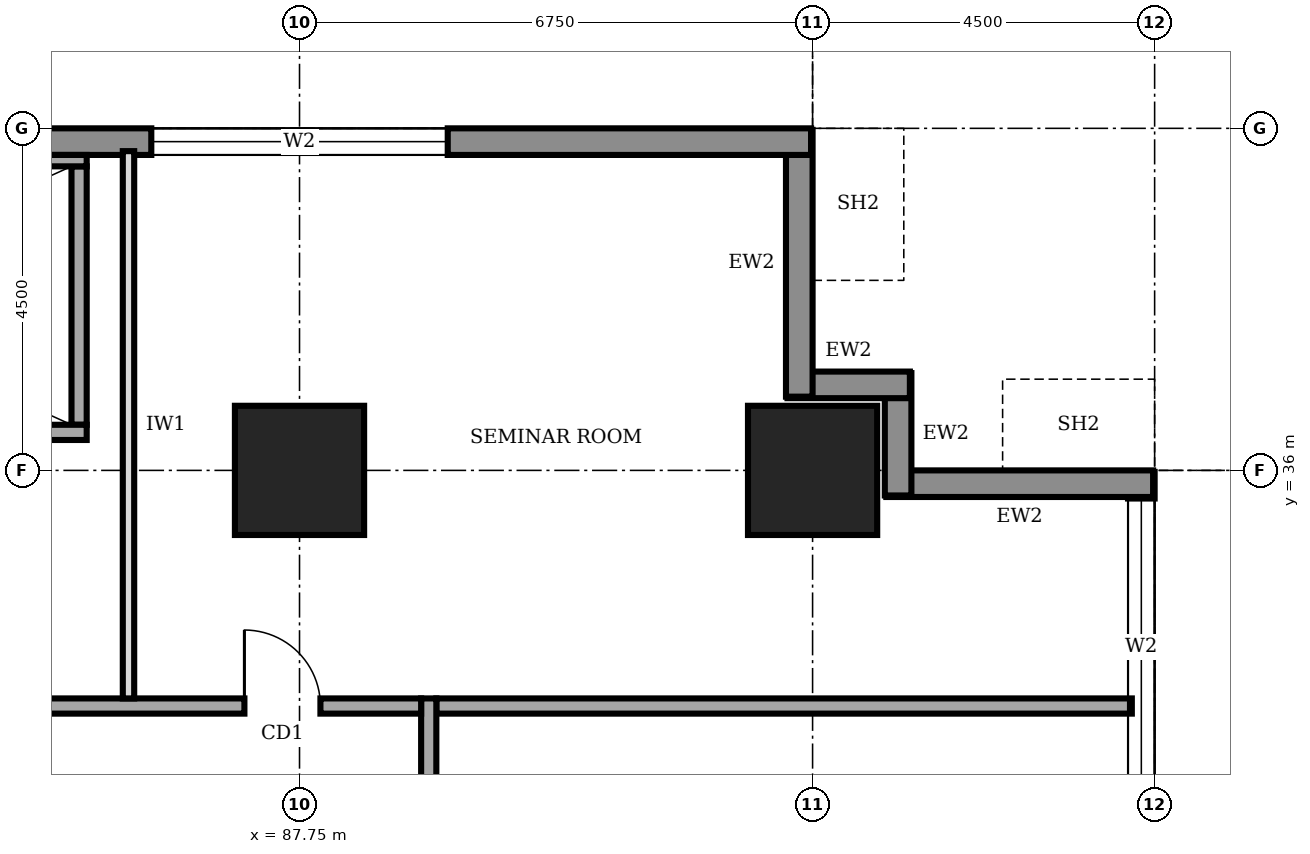
"""IFC4 building model, lengths in metres.
Left out: names, types, materials, properties, quantities, classifications, styles, units other than length and angle.
Written with IfcOpenShell. Run it as: python <this file> out.ifc"""

import sys

from ifc_helpers import new_model, si_unit, direction, frame, frame_2d, origin, origin_2d, place, context, subcontext, project, spatial, rectangle, extrude, element, fill, save


model = new_model("IFC4")
c1 = context("Model", 3, precision=1e-05, world=origin(), true_north=direction((0.0, 1.0)))
c2 = subcontext(c1, "Body", "Model", "MODEL_VIEW")
j1 = project(units=[si_unit("LENGTHUNIT", "METRE"), si_unit("PLANEANGLEUNIT", "RADIAN")], contexts=[c1])
p1 = place(None, origin())
s1 = spatial("IfcSite", under=j1, at=p1, CompositionType="ELEMENT")
p2 = place(p1, origin())
s2 = spatial("IfcBuilding", under=s1, at=p2, CompositionType="ELEMENT")
p3 = place(p2, frame((0.0, 0.0, 69.0)))
s3 = spatial("IfcBuildingStorey", under=s2, at=p3, CompositionType="ELEMENT", Elevation=69.0)
for number, where, z_axis, x_axis in (
    (1, (87.75, 36.0, 0.0), (0.0, 0.0, 1.0), (1.0, 0.0, 0.0)),
    (2, (94.5, 36.0, 0.0), (0.0, 0.0, 1.0), (1.0, 0.0, 0.0)),
):
    element("IfcColumn", number, at=place(p3, frame(where, z_axis=z_axis, x_axis=x_axis)), inside=s3, PredefinedType="COLUMN", context=c2, shape_type="SweptSolid", body=[
        extrude(rectangle(XDim=1.7, YDim=1.7, at=origin_2d()), origin(), (0.0, 0.0, 1.0), 4.0),
    ])
p4 = place(p3, frame((98.825, 4.52, 0.0), z_axis=(0.0, 0.0, 1.0), x_axis=(0.0, 1.0, 0.0)))
e3 = element("IfcWall", 3, at=p4, inside=s3, PredefinedType="STANDARD", context=c2, shape_type="SweptSolid", body=[
    extrude(rectangle(XDim=31.46, YDim=0.35, at=frame_2d((15.73, 0.0))), origin(), (0.0, 0.0, 1.0), 3.75),
])
p5 = place(p4, frame((4.78, 0.0, 0.6)))
e4 = element("IfcOpeningElement", 4, at=p5, cuts=e3, PredefinedType="OPENING", context=c2, shape_type="SweptSolid", body=[
    extrude(rectangle(XDim=3.9, YDim=2.6, at=frame_2d((1.95, 1.3))), frame((0.0, 0.185, 0.0), z_axis=(0.0, -1.0, 0.0), x_axis=(1.0, 0.0, 0.0)), (0.0, 0.0, 1.0), 0.37),
])
p6 = place(p4, frame((9.28, 0.0, 0.6)))
e5 = element("IfcOpeningElement", 5, at=p6, cuts=e3, PredefinedType="OPENING", context=c2, shape_type="SweptSolid", body=[
    extrude(rectangle(XDim=3.9, YDim=2.6, at=frame_2d((1.95, 1.3))), frame((0.0, 0.185, 0.0), z_axis=(0.0, -1.0, 0.0), x_axis=(1.0, 0.0, 0.0)), (0.0, 0.0, 1.0), 0.37),
])
p7 = place(p4, frame((13.78, 0.0, 0.6)))
e6 = element("IfcOpeningElement", 6, at=p7, cuts=e3, PredefinedType="OPENING", context=c2, shape_type="SweptSolid", body=[
    extrude(rectangle(XDim=3.9, YDim=2.6, at=frame_2d((1.95, 1.3))), frame((0.0, 0.185, 0.0), z_axis=(0.0, -1.0, 0.0), x_axis=(1.0, 0.0, 0.0)), (0.0, 0.0, 1.0), 0.37),
])
p8 = place(p4, frame((18.28, 0.0, 0.6)))
e7 = element("IfcOpeningElement", 7, at=p8, cuts=e3, PredefinedType="OPENING", context=c2, shape_type="SweptSolid", body=[
    extrude(rectangle(XDim=3.9, YDim=2.6, at=frame_2d((1.95, 1.3))), frame((0.0, 0.185, 0.0), z_axis=(0.0, -1.0, 0.0), x_axis=(1.0, 0.0, 0.0)), (0.0, 0.0, 1.0), 0.37),
])
p9 = place(p4, frame((22.78, 0.0, 0.6)))
e8 = element("IfcOpeningElement", 8, at=p9, cuts=e3, PredefinedType="OPENING", context=c2, shape_type="SweptSolid", body=[
    extrude(rectangle(XDim=3.9, YDim=2.6, at=frame_2d((1.95, 1.3))), frame((0.0, 0.185, 0.0), z_axis=(0.0, -1.0, 0.0), x_axis=(1.0, 0.0, 0.0)), (0.0, 0.0, 1.0), 0.37),
])
p10 = place(p4, frame((27.21, 0.0, 0.6)))
e9 = element("IfcOpeningElement", 9, at=p10, cuts=e3, PredefinedType="OPENING", context=c2, shape_type="SweptSolid", body=[
    extrude(rectangle(XDim=3.9, YDim=2.6, at=frame_2d((1.95, 1.3))), frame((0.0, 0.185, 0.0), z_axis=(0.0, -1.0, 0.0), x_axis=(1.0, 0.0, 0.0)), (0.0, 0.0, 1.0), 0.37),
])
p11 = place(p3, frame((98.98, 35.825, 0.0), z_axis=(0.0, 0.0, 1.0), x_axis=(-1.0, 0.0, 0.0)))
e10 = element("IfcWall", 10, at=p11, inside=s3, PredefinedType="STANDARD", context=c2, shape_type="SweptSolid", body=[
    extrude(rectangle(XDim=3.51, YDim=0.35, at=frame_2d((1.755, 0.0))), origin(), (0.0, 0.0, 1.0), 2.85),
])
for number, where, z_axis, x_axis in (
    (11, (95.625, 35.67, 0.0), (0.0, 0.0, 1.0), (0.0, 1.0, 0.0)),
    (12, (95.78, 37.125, 0.0), (0.0, 0.0, 1.0), (-1.0, 0.0, 0.0)),
):
    element("IfcWall", number, at=place(p3, frame(where, z_axis=z_axis, x_axis=x_axis)), inside=s3, PredefinedType="STANDARD", context=c2, shape_type="SweptSolid", body=[
        extrude(rectangle(XDim=1.61, YDim=0.35, at=frame_2d((0.805, 0.0))), origin(), (0.0, 0.0, 1.0), 3.75),
    ])
p12 = place(p3, frame((94.325, 36.97, 0.0), z_axis=(0.0, 0.0, 1.0), x_axis=(0.0, 1.0, 0.0)))
e13 = element("IfcWall", 13, at=p12, inside=s3, PredefinedType="STANDARD", context=c2, shape_type="SweptSolid", body=[
    extrude(rectangle(XDim=3.51, YDim=0.35, at=frame_2d((1.755, 0.0))), origin(), (0.0, 0.0, 1.0), 2.85),
])
p13 = place(p3, frame((94.48, 40.325, 0.0), z_axis=(0.0, 0.0, 1.0), x_axis=(-1.0, 0.0, 0.0)))
e14 = element("IfcWall", 14, at=p13, inside=s3, PredefinedType="STANDARD", context=c2, shape_type="SweptSolid", body=[
    extrude(rectangle(XDim=26.96, YDim=0.35, at=frame_2d((13.48, 0.0))), origin(), (0.0, 0.0, 1.0), 3.75),
])
p14 = place(p13, frame((22.71, 0.0, 0.6)))
e15 = element("IfcOpeningElement", 15, at=p14, cuts=e14, PredefinedType="OPENING", context=c2, shape_type="SweptSolid", body=[
    extrude(rectangle(XDim=3.9, YDim=2.6, at=frame_2d((1.95, 1.3))), frame((0.0, 0.185, 0.0), z_axis=(0.0, -1.0, 0.0), x_axis=(1.0, 0.0, 0.0)), (0.0, 0.0, 1.0), 0.37),
])
p15 = place(p13, frame((18.28, 0.0, 0.6)))
e16 = element("IfcOpeningElement", 16, at=p15, cuts=e14, PredefinedType="OPENING", context=c2, shape_type="SweptSolid", body=[
    extrude(rectangle(XDim=3.9, YDim=2.6, at=frame_2d((1.95, 1.3))), frame((0.0, 0.185, 0.0), z_axis=(0.0, -1.0, 0.0), x_axis=(1.0, 0.0, 0.0)), (0.0, 0.0, 1.0), 0.37),
])
p16 = place(p13, frame((4.78, 0.0, 0.6)))
e17 = element("IfcOpeningElement", 17, at=p16, cuts=e14, PredefinedType="OPENING", context=c2, shape_type="SweptSolid", body=[
    extrude(rectangle(XDim=3.9, YDim=2.6, at=frame_2d((1.95, 1.3))), frame((0.0, 0.185, 0.0), z_axis=(0.0, -1.0, 0.0), x_axis=(1.0, 0.0, 0.0)), (0.0, 0.0, 1.0), 0.37),
])
p17 = place(p3, frame((89.45, 7.7, 0.0), z_axis=(0.0, 0.0, 1.0), x_axis=(0.0, 1.0, 0.0)))
e18 = element("IfcWall", 18, at=p17, inside=s3, PredefinedType="SOLIDWALL", context=c2, shape_type="SweptSolid", body=[
    extrude(rectangle(XDim=25.3, YDim=0.2, at=frame_2d((12.65, 0.0))), origin(), (0.0, 0.0, 1.0), 3.75),
])
p18 = place(p17, frame((2.3, 0.0, 0.0)))
e19 = element("IfcOpeningElement", 19, at=p18, cuts=e18, PredefinedType="OPENING", context=c2, shape_type="SweptSolid", body=[
    extrude(rectangle(XDim=1.0, YDim=2.1, at=frame_2d((0.5, 1.05))), frame((0.0, 0.11, 0.0), z_axis=(0.0, -1.0, 0.0), x_axis=(1.0, 0.0, 0.0)), (0.0, 0.0, 1.0), 0.22),
])
p19 = place(p17, frame((6.55, 0.0, 0.0)))
e20 = element("IfcOpeningElement", 20, at=p19, cuts=e18, PredefinedType="OPENING", context=c2, shape_type="SweptSolid", body=[
    extrude(rectangle(XDim=0.9, YDim=2.1, at=frame_2d((0.45, 1.05))), frame((0.0, 0.11, 0.0), z_axis=(0.0, -1.0, 0.0), x_axis=(1.0, 0.0, 0.0)), (0.0, 0.0, 1.0), 0.22),
])
p20 = place(p17, frame((9.75, 0.0, 0.0)))
e21 = element("IfcOpeningElement", 21, at=p20, cuts=e18, PredefinedType="OPENING", context=c2, shape_type="SweptSolid", body=[
    extrude(rectangle(XDim=0.9, YDim=2.1, at=frame_2d((0.45, 1.05))), frame((0.0, 0.11, 0.0), z_axis=(0.0, -1.0, 0.0), x_axis=(1.0, 0.0, 0.0)), (0.0, 0.0, 1.0), 0.22),
])
p21 = place(p17, frame((15.3, 0.0, 0.0)))
e22 = element("IfcOpeningElement", 22, at=p21, cuts=e18, PredefinedType="OPENING", context=c2, shape_type="SweptSolid", body=[
    extrude(rectangle(XDim=0.9, YDim=2.1, at=frame_2d((0.45, 1.05))), frame((0.0, 0.11, 0.0), z_axis=(0.0, -1.0, 0.0), x_axis=(1.0, 0.0, 0.0)), (0.0, 0.0, 1.0), 0.22),
])
p22 = place(p17, frame((17.8, 0.0, 0.0)))
e23 = element("IfcOpeningElement", 23, at=p22, cuts=e18, PredefinedType="OPENING", context=c2, shape_type="SweptSolid", body=[
    extrude(rectangle(XDim=1.0, YDim=2.1, at=frame_2d((0.5, 1.05))), frame((0.0, 0.11, 0.0), z_axis=(0.0, -1.0, 0.0), x_axis=(1.0, 0.0, 0.0)), (0.0, 0.0, 1.0), 0.22),
])
p23 = place(p17, frame((12.7, 0.0, 0.0)))
e24 = element("IfcOpeningElement", 24, at=p23, cuts=e18, PredefinedType="OPENING", context=c2, shape_type="SweptSolid", body=[
    extrude(rectangle(XDim=1.0, YDim=2.1, at=frame_2d((0.5, 1.05))), frame((0.0, 0.11, 0.0), z_axis=(0.0, -1.0, 0.0), x_axis=(1.0, 0.0, 0.0)), (0.0, 0.0, 1.0), 0.22),
])
p24 = place(p17, frame((21.8, 0.0, 0.0)))
e25 = element("IfcOpeningElement", 25, at=p24, cuts=e18, PredefinedType="OPENING", context=c2, shape_type="SweptSolid", body=[
    extrude(rectangle(XDim=1.0, YDim=2.1, at=frame_2d((0.5, 1.05))), frame((0.0, 0.11, 0.0), z_axis=(0.0, -1.0, 0.0), x_axis=(1.0, 0.0, 0.0)), (0.0, 0.0, 1.0), 0.22),
])
p25 = place(p3, frame((89.35, 32.9, 0.0), z_axis=(0.0, 0.0, 1.0), x_axis=(-1.0, 0.0, 0.0)))
e26 = element("IfcWall", 26, at=p25, inside=s3, PredefinedType="SOLIDWALL", context=c2, shape_type="SweptSolid", body=[
    extrude(rectangle(XDim=16.9, YDim=0.2, at=frame_2d((8.45, 0.0))), origin(), (0.0, 0.0, 1.0), 3.75),
])
p26 = place(p25, frame((14.375, 0.0, 0.0)))
e27 = element("IfcOpeningElement", 27, at=p26, cuts=e26, PredefinedType="OPENING", context=c2, shape_type="SweptSolid", body=[
    extrude(rectangle(XDim=1.0, YDim=2.1, at=frame_2d((0.5, 1.05))), frame((0.0, 0.11, 0.0), z_axis=(0.0, -1.0, 0.0), x_axis=(1.0, 0.0, 0.0)), (0.0, 0.0, 1.0), 0.22),
])
p27 = place(p25, frame((7.85, 0.0, 0.0)))
e28 = element("IfcOpeningElement", 28, at=p27, cuts=e26, PredefinedType="OPENING", context=c2, shape_type="SweptSolid", body=[
    extrude(rectangle(XDim=1.0, YDim=2.1, at=frame_2d((0.5, 1.05))), frame((0.0, 0.11, 0.0), z_axis=(0.0, -1.0, 0.0), x_axis=(1.0, 0.0, 0.0)), (0.0, 0.0, 1.0), 0.22),
])
p28 = place(p25, frame((1.325, 0.0, 0.0)))
e29 = element("IfcOpeningElement", 29, at=p28, cuts=e26, PredefinedType="OPENING", context=c2, shape_type="SweptSolid", body=[
    extrude(rectangle(XDim=1.0, YDim=2.1, at=frame_2d((0.5, 1.05))), frame((0.0, 0.11, 0.0), z_axis=(0.0, -1.0, 0.0), x_axis=(1.0, 0.0, 0.0)), (0.0, 0.0, 1.0), 0.22),
])
p29 = place(p3, frame((89.55, 32.9, 0.0), z_axis=(0.0, 0.0, 1.0), x_axis=(1.0, 0.0, 0.0)))
e30 = element("IfcWall", 30, at=p29, inside=s3, PredefinedType="SOLIDWALL", context=c2, shape_type="SweptSolid", body=[
    extrude(rectangle(XDim=9.15, YDim=0.2, at=frame_2d((4.575, 0.0))), origin(), (0.0, 0.0, 1.0), 3.75),
])
p30 = place(p3, frame((85.5, 33.0, 0.0), z_axis=(0.0, 0.0, 1.0), x_axis=(0.0, 1.0, 0.0)))
e31 = element("IfcWall", 31, at=p30, inside=s3, PredefinedType="PARTITIONING", context=c2, shape_type="SweptSolid", body=[
    extrude(rectangle(XDim=7.2, YDim=0.15, at=frame_2d((3.6, 0.0))), origin(), (0.0, 0.0, 1.0), 3.75),
])
p31 = place(p3, frame((77.05, 36.5, 0.0), z_axis=(0.0, 0.0, 1.0), x_axis=(1.0, 0.0, 0.0)))
e32 = element("IfcWall", 32, at=p31, inside=s3, PredefinedType="SOLIDWALL", context=c2, shape_type="SweptSolid", body=[
    extrude(rectangle(XDim=7.9, YDim=0.2, at=frame_2d((3.95, 0.0))), origin(), (0.0, 0.0, 1.0), 3.75),
])
p32 = place(p31, frame((6.3, 0.0, 0.0)))
e33 = element("IfcOpeningElement", 33, at=p32, cuts=e32, PredefinedType="OPENING", context=c2, shape_type="SweptSolid", body=[
    extrude(rectangle(XDim=1.0, YDim=2.1, at=frame_2d((0.5, 1.05))), frame((0.0, 0.11, 0.0), z_axis=(0.0, -1.0, 0.0), x_axis=(1.0, 0.0, 0.0)), (0.0, 0.0, 1.0), 0.22),
])
p33 = place(p3, frame((77.05, 40.075, 0.0), z_axis=(0.0, 0.0, 1.0), x_axis=(1.0, 0.0, 0.0)))
e34 = element("IfcWall", 34, at=p33, inside=s3, PredefinedType="SOLIDWALL", context=c2, shape_type="SweptSolid", body=[
    extrude(rectangle(XDim=7.9, YDim=0.15, at=frame_2d((3.95, 0.0))), origin(), (0.0, 0.0, 1.0), 3.75),
])
p34 = place(p3, frame((84.85, 36.6, 0.0), z_axis=(0.0, 0.0, 1.0), x_axis=(0.0, 1.0, 0.0)))
e35 = element("IfcWall", 35, at=p34, inside=s3, PredefinedType="SOLIDWALL", context=c2, shape_type="SweptSolid", body=[
    extrude(rectangle(XDim=3.4, YDim=0.2, at=frame_2d((1.7, 0.0))), origin(), (0.0, 0.0, 1.0), 3.75),
])
p35 = place(p10, origin())
e36 = element("IfcWindow", 36, at=p35, inside=s3, PartitioningType="SINGLE_PANEL", PredefinedType="WINDOW", context=c2, shape_type="SweptSolid", body=[
    extrude(rectangle(XDim=3.9, YDim=2.6, at=frame_2d((1.95, 1.3))), frame((0.0, 0.03, 0.0), z_axis=(0.0, -1.0, 0.0), x_axis=(1.0, 0.0, 0.0)), (0.0, 0.0, 1.0), 0.06),
])
fill(e9, e36)
p36 = place(p16, origin())
e37 = element("IfcWindow", 37, at=p36, inside=s3, PartitioningType="SINGLE_PANEL", PredefinedType="WINDOW", context=c2, shape_type="SweptSolid", body=[
    extrude(rectangle(XDim=3.9, YDim=2.6, at=frame_2d((1.95, 1.3))), frame((0.0, 0.03, 0.0), z_axis=(0.0, -1.0, 0.0), x_axis=(1.0, 0.0, 0.0)), (0.0, 0.0, 1.0), 0.06),
])
fill(e17, e37)
p37 = place(p28, frame((1.0, 0.0, 0.0), z_axis=(0.0, 0.0, 1.0), x_axis=(-1.0, 0.0, 0.0)))
e38 = element("IfcDoor", 38, at=p37, inside=s3, OperationType="SINGLE_SWING_LEFT", PredefinedType="DOOR", context=c2, shape_type="SweptSolid", body=[
    extrude(rectangle(XDim=1.0, YDim=2.1, at=frame_2d((0.5, 1.05))), frame((0.0, 0.025, 0.0), z_axis=(0.0, -1.0, 0.0), x_axis=(1.0, 0.0, 0.0)), (0.0, 0.0, 1.0), 0.05),
])
fill(e29, e38)
save(model, sys.argv[1])
